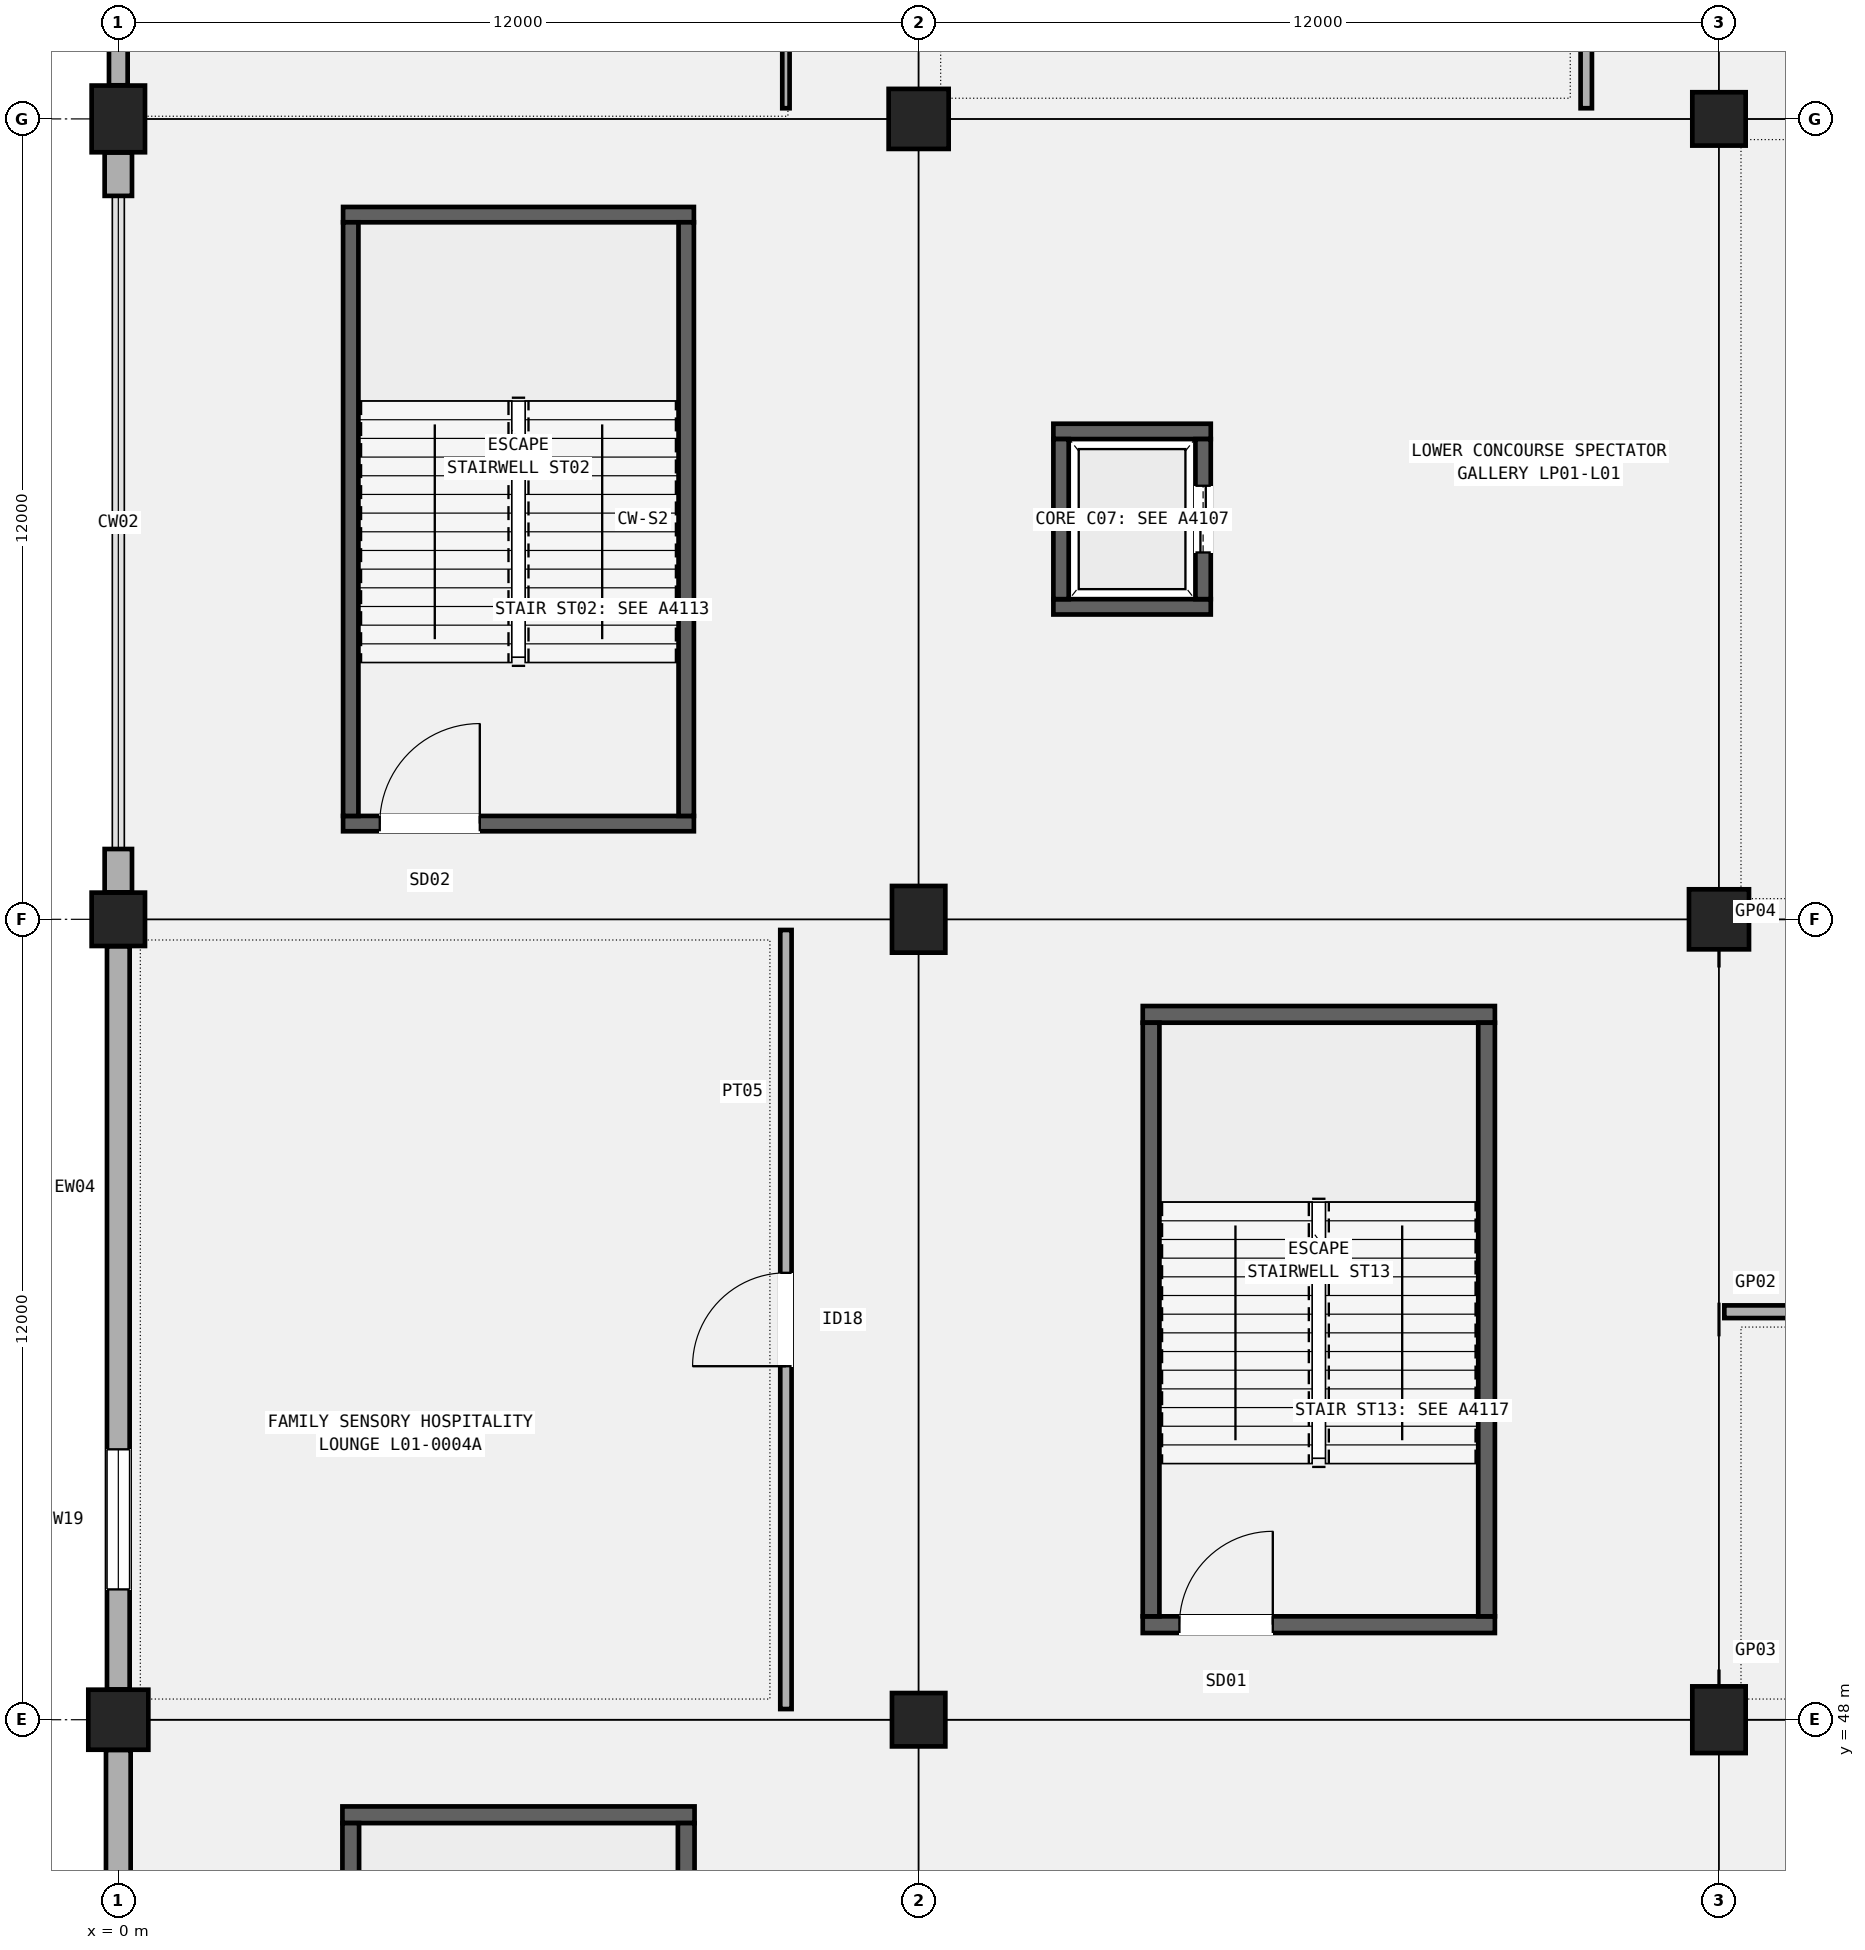
"""IFC4 building model, lengths in metres.
Left out: names, types, materials, properties, quantities, classifications, styles, units other than length and angle.
Written with IfcOpenShell. Run it as: python <this file> out.ifc"""

import sys

from ifc_helpers import new_model, si_unit, direction, frame, frame_2d, origin, origin_2d, place, context, subcontext, project, spatial, rectangle, extrude, element, fill, save


model = new_model("IFC4")
c1 = context("Model", 3, precision=1e-05, world=origin(), true_north=direction((0.0, 1.0)))
c2 = subcontext(c1, "Body", "Model", "MODEL_VIEW")
j1 = project(units=[si_unit("LENGTHUNIT", "METRE"), si_unit("PLANEANGLEUNIT", "RADIAN")], contexts=[c1])
p1 = place(None, origin())
s1 = spatial("IfcSite", under=j1, at=p1, CompositionType="ELEMENT")
p2 = place(p1, origin())
s2 = spatial("IfcBuilding", under=s1, at=p2, CompositionType="ELEMENT")
p3 = place(p2, frame((0.0, 0.0, 5.4)))
s3 = spatial("IfcBuildingStorey", under=s2, at=p3, CompositionType="ELEMENT", Elevation=5.4)
p4 = place(p3, frame((0.0, 48.0, 0.0), z_axis=(0.0, 0.0, 1.0), x_axis=(1.0, 0.0, 0.0)))
e1 = element("IfcColumn", 1, at=p4, inside=s3, PredefinedType="COLUMN", context=c2, shape_type="SweptSolid", body=[
    extrude(rectangle(XDim=0.9, YDim=0.9, at=origin_2d()), origin(), (0.0, 0.0, 1.0), 4.8),
])
p5 = place(p3, frame((0.0, 60.0, 0.0), z_axis=(0.0, 0.0, 1.0), x_axis=(1.0, 0.0, 0.0)))
e2 = element("IfcColumn", 2, at=p5, inside=s3, PredefinedType="COLUMN", context=c2, shape_type="SweptSolid", body=[
    extrude(rectangle(XDim=0.8, YDim=0.8, at=origin_2d()), origin(), (0.0, 0.0, 1.0), 4.8),
])
p6 = place(p3, frame((0.0, 72.0, 0.0), z_axis=(0.0, 0.0, 1.0), x_axis=(1.0, 0.0, 0.0)))
e3 = element("IfcColumn", 3, at=p6, inside=s3, PredefinedType="COLUMN", context=c2, shape_type="SweptSolid", body=[
    extrude(rectangle(XDim=0.8, YDim=1.0, at=origin_2d()), origin(), (0.0, 0.0, 1.0), 4.8),
])
p7 = place(p3, frame((12.0, 48.0, 0.0), z_axis=(0.0, 0.0, 1.0), x_axis=(1.0, 0.0, 0.0)))
e4 = element("IfcColumn", 4, at=p7, inside=s3, PredefinedType="COLUMN", context=c2, shape_type="SweptSolid", body=[
    extrude(rectangle(XDim=0.8, YDim=0.8, at=origin_2d()), origin(), (0.0, 0.0, 1.0), 4.8),
])
p8 = place(p3, frame((12.0, 60.0, 0.0), z_axis=(0.0, 0.0, 1.0), x_axis=(1.0, 0.0, 0.0)))
e5 = element("IfcColumn", 5, at=p8, inside=s3, PredefinedType="COLUMN", context=c2, shape_type="SweptSolid", body=[
    extrude(rectangle(XDim=0.8, YDim=1.0, at=origin_2d()), origin(), (0.0, 0.0, 1.0), 4.8),
])
p9 = place(p3, frame((12.0, 72.0, 0.0), z_axis=(0.0, 0.0, 1.0), x_axis=(1.0, 0.0, 0.0)))
e6 = element("IfcColumn", 6, at=p9, inside=s3, PredefinedType="COLUMN", context=c2, shape_type="SweptSolid", body=[
    extrude(rectangle(XDim=0.9, YDim=0.9, at=origin_2d()), origin(), (0.0, 0.0, 1.0), 4.8),
])
p10 = place(p3, frame((24.0, 48.0, 0.0), z_axis=(0.0, 0.0, 1.0), x_axis=(1.0, 0.0, 0.0)))
e7 = element("IfcColumn", 7, at=p10, inside=s3, PredefinedType="COLUMN", context=c2, shape_type="SweptSolid", body=[
    extrude(rectangle(XDim=0.8, YDim=1.0, at=origin_2d()), origin(), (0.0, 0.0, 1.0), 4.8),
])
p11 = place(p3, frame((24.0, 60.0, 0.0), z_axis=(0.0, 0.0, 1.0), x_axis=(1.0, 0.0, 0.0)))
e8 = element("IfcColumn", 8, at=p11, inside=s3, PredefinedType="COLUMN", context=c2, shape_type="SweptSolid", body=[
    extrude(rectangle(XDim=0.9, YDim=0.9, at=origin_2d()), origin(), (0.0, 0.0, 1.0), 4.8),
])
p12 = place(p3, frame((24.0, 72.0, 0.0), z_axis=(0.0, 0.0, 1.0), x_axis=(1.0, 0.0, 0.0)))
e9 = element("IfcColumn", 9, at=p12, inside=s3, PredefinedType="COLUMN", context=c2, shape_type="SweptSolid", body=[
    extrude(rectangle(XDim=0.8, YDim=0.8, at=origin_2d()), origin(), (0.0, 0.0, 1.0), 4.8),
])
p13 = place(p3, frame((0.0, 36.504, 0.0), z_axis=(0.0, 0.0, 1.0), x_axis=(0.0, 1.0, 0.0)))
e10 = element("IfcWall", 10, at=p13, inside=s3, PredefinedType="SOLIDWALL", context=c2, shape_type="SweptSolid", body=[
    extrude(rectangle(XDim=11.042, YDim=0.37, at=frame_2d((5.521, 0.0))), origin(), (0.0, 0.0, 1.0), 4.2),
])
p14 = place(p13, frame((2.75, 0.0, 0.95)))
e11 = element("IfcOpeningElement", 11, at=p14, cuts=e10, PredefinedType="OPENING", context=c2, shape_type="SweptSolid", body=[
    extrude(rectangle(XDim=2.1, YDim=1.85, at=frame_2d((1.05, 0.925))), frame((0.0, 0.195, 0.0), z_axis=(0.0, -1.0, 0.0), x_axis=(1.0, 0.0, 0.0)), (0.0, 0.0, 1.0), 0.39),
])
p15 = place(p3, frame((0.0, 48.454, 0.0), z_axis=(0.0, 0.0, 1.0), x_axis=(0.0, 1.0, 0.0)))
e12 = element("IfcWall", 12, at=p15, inside=s3, PredefinedType="SOLIDWALL", context=c2, shape_type="SweptSolid", body=[
    extrude(rectangle(XDim=11.142, YDim=0.34, at=frame_2d((5.571, 0.0))), origin(), (0.0, 0.0, 1.0), 4.15),
])
p16 = place(p15, frame((1.5, 0.0, 0.95)))
e13 = element("IfcOpeningElement", 13, at=p16, cuts=e12, PredefinedType="OPENING", context=c2, shape_type="SweptSolid", body=[
    extrude(rectangle(XDim=2.1, YDim=2.25, at=frame_2d((1.05, 1.125))), frame((0.0, 0.18, 0.0), z_axis=(0.0, -1.0, 0.0), x_axis=(1.0, 0.0, 0.0)), (0.0, 0.0, 1.0), 0.36),
])
p17 = place(p3, frame((0.0, 60.404, 0.0), z_axis=(0.0, 0.0, 1.0), x_axis=(0.0, 1.0, 0.0)))
e14 = element("IfcWall", 14, at=p17, inside=s3, PredefinedType="SOLIDWALL", context=c2, shape_type="SweptSolid", body=[
    extrude(rectangle(XDim=0.65, YDim=0.41, at=frame_2d((0.325, 0.0))), origin(), (0.0, 0.0, 1.0), 4.2),
])
p18 = place(p3, frame((0.0, 70.846, 0.0), z_axis=(0.0, 0.0, 1.0), x_axis=(0.0, 1.0, 0.0)))
e15 = element("IfcWall", 15, at=p18, inside=s3, PredefinedType="SOLIDWALL", context=c2, shape_type="SweptSolid", body=[
    extrude(rectangle(XDim=0.65, YDim=0.41, at=frame_2d((0.325, 0.0))), origin(), (0.0, 0.0, 1.0), 4.2),
])
p19 = place(p3, frame((0.0, 72.504, 0.0), z_axis=(0.0, 0.0, 1.0), x_axis=(0.0, 1.0, 0.0)))
e16 = element("IfcWall", 16, at=p19, inside=s3, PredefinedType="SOLIDWALL", context=c2, shape_type="SweptSolid", body=[
    extrude(rectangle(XDim=11.042, YDim=0.28, at=frame_2d((5.521, 0.0))), origin(), (0.0, 0.0, 1.0), 4.15),
])
p20 = place(p19, frame((1.5, 0.0, 0.95)))
e17 = element("IfcOpeningElement", 17, at=p20, cuts=e16, PredefinedType="OPENING", context=c2, shape_type="SweptSolid", body=[
    extrude(rectangle(XDim=2.1, YDim=2.6, at=frame_2d((1.05, 1.3))), frame((0.0, 0.15, 0.0), z_axis=(0.0, -1.0, 0.0), x_axis=(1.0, 0.0, 0.0)), (0.0, 0.0, 1.0), 0.3),
])
p21 = place(p3, frame((3.36, 46.575, 0.0), z_axis=(0.0, 0.0, 1.0), x_axis=(1.0, 0.0, 0.0)))
e18 = element("IfcWall", 18, at=p21, inside=s3, PredefinedType="SHEAR", context=c2, shape_type="SweptSolid", body=[
    extrude(rectangle(XDim=5.28, YDim=0.25, at=frame_2d((2.64, 0.0))), origin(), (0.0, 0.0, 1.0), 4.55),
])
for number, where, z_axis, x_axis in (
    (19, (3.485, 37.55, 0.0), (0.0, 0.0, 1.0), (0.0, 1.0, 0.0)),
    (20, (8.515, 37.55, 0.0), (0.0, 0.0, 1.0), (0.0, 1.0, 0.0)),
):
    element("IfcWall", number, at=place(p3, frame(where, z_axis=z_axis, x_axis=x_axis)), inside=s3, PredefinedType="SHEAR", context=c2, shape_type="SweptSolid", body=[
        extrude(rectangle(XDim=8.9, YDim=0.25, at=frame_2d((4.45, 0.0))), origin(), (0.0, 0.0, 1.0), 4.55),
    ])
p22 = place(p3, frame((3.37, 61.435, 0.0), z_axis=(0.0, 0.0, 1.0), x_axis=(1.0, 0.0, 0.0)))
e21 = element("IfcWall", 21, at=p22, inside=s3, PredefinedType="SHEAR", context=c2, shape_type="SweptSolid", body=[
    extrude(rectangle(XDim=5.26, YDim=0.23, at=frame_2d((2.63, 0.0))), origin(), (0.0, 0.0, 1.0), 4.55),
])
p23 = place(p22, frame((0.55, 0.0, 0.0)))
e22 = element("IfcOpeningElement", 22, at=p23, cuts=e21, PredefinedType="OPENING", context=c2, shape_type="SweptSolid", body=[
    extrude(rectangle(XDim=1.5, YDim=2.2, at=frame_2d((0.75, 1.1))), frame((0.0, 0.125, 0.0), z_axis=(0.0, -1.0, 0.0), x_axis=(1.0, 0.0, 0.0)), (0.0, 0.0, 1.0), 0.25),
])
p24 = place(p3, frame((3.37, 70.565, 0.0), z_axis=(0.0, 0.0, 1.0), x_axis=(1.0, 0.0, 0.0)))
e23 = element("IfcWall", 23, at=p24, inside=s3, PredefinedType="SHEAR", context=c2, shape_type="SweptSolid", body=[
    extrude(rectangle(XDim=5.26, YDim=0.23, at=frame_2d((2.63, 0.0))), origin(), (0.0, 0.0, 1.0), 4.55),
])
for number, where, z_axis, x_axis in (
    (24, (3.485, 61.55, 0.0), (0.0, 0.0, 1.0), (0.0, 1.0, 0.0)),
    (25, (8.515, 61.55, 0.0), (0.0, 0.0, 1.0), (0.0, 1.0, 0.0)),
):
    element("IfcWall", number, at=place(p3, frame(where, z_axis=z_axis, x_axis=x_axis)), inside=s3, PredefinedType="SHEAR", context=c2, shape_type="SweptSolid", body=[
        extrude(rectangle(XDim=8.9, YDim=0.23, at=frame_2d((4.45, 0.0))), origin(), (0.0, 0.0, 1.0), 4.55),
    ])
p25 = place(p3, frame((15.36, 49.425, 0.0), z_axis=(0.0, 0.0, 1.0), x_axis=(1.0, 0.0, 0.0)))
e26 = element("IfcWall", 26, at=p25, inside=s3, PredefinedType="SHEAR", context=c2, shape_type="SweptSolid", body=[
    extrude(rectangle(XDim=5.28, YDim=0.25, at=frame_2d((2.64, 0.0))), origin(), (0.0, 0.0, 1.0), 4.55),
])
p26 = place(p25, frame((0.55, 0.0, 0.0)))
e27 = element("IfcOpeningElement", 27, at=p26, cuts=e26, PredefinedType="OPENING", context=c2, shape_type="SweptSolid", body=[
    extrude(rectangle(XDim=1.4, YDim=2.15, at=frame_2d((0.7, 1.075))), frame((0.0, 0.135, 0.0), z_axis=(0.0, -1.0, 0.0), x_axis=(1.0, 0.0, 0.0)), (0.0, 0.0, 1.0), 0.27),
])
p27 = place(p3, frame((15.36, 58.575, 0.0), z_axis=(0.0, 0.0, 1.0), x_axis=(1.0, 0.0, 0.0)))
e28 = element("IfcWall", 28, at=p27, inside=s3, PredefinedType="SHEAR", context=c2, shape_type="SweptSolid", body=[
    extrude(rectangle(XDim=5.28, YDim=0.25, at=frame_2d((2.64, 0.0))), origin(), (0.0, 0.0, 1.0), 4.55),
])
for number, where, z_axis, x_axis in (
    (29, (15.485, 49.55, 0.0), (0.0, 0.0, 1.0), (0.0, 1.0, 0.0)),
    (30, (20.515, 49.55, 0.0), (0.0, 0.0, 1.0), (0.0, 1.0, 0.0)),
):
    element("IfcWall", number, at=place(p3, frame(where, z_axis=z_axis, x_axis=x_axis)), inside=s3, PredefinedType="SHEAR", context=c2, shape_type="SweptSolid", body=[
        extrude(rectangle(XDim=8.9, YDim=0.25, at=frame_2d((4.45, 0.0))), origin(), (0.0, 0.0, 1.0), 4.55),
    ])
for number, where, z_axis, x_axis in (
    (31, (14.02, 64.685, 0.0), (0.0, 0.0, 1.0), (1.0, 0.0, 0.0)),
    (32, (14.02, 67.315, 0.0), (0.0, 0.0, 1.0), (1.0, 0.0, 0.0)),
):
    element("IfcWall", number, at=place(p3, frame(where, z_axis=z_axis, x_axis=x_axis)), inside=s3, PredefinedType="SHEAR", context=c2, shape_type="SweptSolid", body=[
        extrude(rectangle(XDim=2.36, YDim=0.23, at=frame_2d((1.18, 0.0))), origin(), (0.0, 0.0, 1.0), 4.55),
    ])
p28 = place(p3, frame((14.135, 64.8, 0.0), z_axis=(0.0, 0.0, 1.0), x_axis=(0.0, 1.0, 0.0)))
e33 = element("IfcWall", 33, at=p28, inside=s3, PredefinedType="SHEAR", context=c2, shape_type="SweptSolid", body=[
    extrude(rectangle(XDim=2.4, YDim=0.23, at=frame_2d((1.2, 0.0))), origin(), (0.0, 0.0, 1.0), 4.55),
])
p29 = place(p3, frame((16.265, 64.8, 0.0), z_axis=(0.0, 0.0, 1.0), x_axis=(0.0, 1.0, 0.0)))
e34 = element("IfcWall", 34, at=p29, inside=s3, PredefinedType="SHEAR", context=c2, shape_type="SweptSolid", body=[
    extrude(rectangle(XDim=2.4, YDim=0.23, at=frame_2d((1.2, 0.0))), origin(), (0.0, 0.0, 1.0), 4.55),
])
p30 = place(p29, frame((0.7, 0.0, 0.0)))
e35 = element("IfcOpeningElement", 35, at=p30, cuts=e34, PredefinedType="OPENING", context=c2, shape_type="SweptSolid", body=[
    extrude(rectangle(XDim=1.0, YDim=2.15, at=frame_2d((0.5, 1.075))), frame((0.0, 0.125, 0.0), z_axis=(0.0, -1.0, 0.0), x_axis=(1.0, 0.0, 0.0)), (0.0, 0.0, 1.0), 0.25),
])
p31 = place(p3, frame((10.01, 48.16, 0.0), z_axis=(0.0, 0.0, 1.0), x_axis=(0.0, 1.0, 0.0)))
e36 = element("IfcWall", 36, at=p31, inside=s3, PredefinedType="PARTITIONING", context=c2, shape_type="SweptSolid", body=[
    extrude(rectangle(XDim=11.68, YDim=0.17, at=frame_2d((5.84, 0.0))), origin(), (0.0, 0.0, 1.0), 3.92),
])
p32 = place(p31, frame((5.14, 0.0, 0.0)))
e37 = element("IfcOpeningElement", 37, at=p32, cuts=e36, PredefinedType="OPENING", context=c2, shape_type="SweptSolid", body=[
    extrude(rectangle(XDim=1.4, YDim=2.24, at=frame_2d((0.7, 1.12))), frame((0.0, 0.095, 0.0), z_axis=(0.0, -1.0, 0.0), x_axis=(1.0, 0.0, 0.0)), (0.0, 0.0, 1.0), 0.19),
])
p33 = place(p3, frame((10.01, 72.16, 0.0), z_axis=(0.0, 0.0, 1.0), x_axis=(0.0, 1.0, 0.0)))
e38 = element("IfcWall", 38, at=p33, inside=s3, PredefinedType="PARTITIONING", context=c2, shape_type="SweptSolid", body=[
    extrude(rectangle(XDim=11.68, YDim=0.11, at=frame_2d((5.84, 0.0))), origin(), (0.0, 0.0, 1.0), 3.92),
])
p34 = place(p33, frame((5.12, 0.0, 0.0)))
e39 = element("IfcOpeningElement", 39, at=p34, cuts=e38, PredefinedType="OPENING", context=c2, shape_type="SweptSolid", body=[
    extrude(rectangle(XDim=1.44, YDim=2.26, at=frame_2d((0.72, 1.13))), frame((0.0, 0.065, 0.0), z_axis=(0.0, -1.0, 0.0), x_axis=(1.0, 0.0, 0.0)), (0.0, 0.0, 1.0), 0.13),
])
p35 = place(p3, frame((22.01, 72.16, 0.0), z_axis=(0.0, 0.0, 1.0), x_axis=(0.0, 1.0, 0.0)))
e40 = element("IfcWall", 40, at=p35, inside=s3, PredefinedType="PARTITIONING", context=c2, shape_type="SweptSolid", body=[
    extrude(rectangle(XDim=11.68, YDim=0.17, at=frame_2d((5.84, 0.0))), origin(), (0.0, 0.0, 1.0), 3.92),
])
p36 = place(p35, frame((5.015, 0.0, 0.0)))
e41 = element("IfcOpeningElement", 41, at=p36, cuts=e40, PredefinedType="OPENING", context=c2, shape_type="SweptSolid", body=[
    extrude(rectangle(XDim=1.65, YDim=2.28, at=frame_2d((0.825, 1.14))), frame((0.0, 0.095, 0.0), z_axis=(0.0, -1.0, 0.0), x_axis=(1.0, 0.0, 0.0)), (0.0, 0.0, 1.0), 0.19),
])
p37 = place(p3, frame((24.08, 54.117, 0.0), z_axis=(0.0, 0.0, 1.0), x_axis=(1.0, 0.0, 0.0)))
e42 = element("IfcWall", 42, at=p37, inside=s3, PredefinedType="PARTITIONING", context=c2, shape_type="SweptSolid", body=[
    extrude(rectangle(XDim=10.34, YDim=0.19, at=frame_2d((5.17, 0.0))), origin(), (0.0, 0.0, 1.0), 3.92),
])
p38 = place(p16, origin())
e43 = element("IfcWindow", 43, at=p38, inside=s3, PartitioningType="SINGLE_PANEL", PredefinedType="WINDOW", context=c2, shape_type="SweptSolid", body=[
    extrude(rectangle(XDim=2.1, YDim=2.25, at=frame_2d((1.05, 1.125))), frame((0.0, 0.03, 0.0), z_axis=(0.0, -1.0, 0.0), x_axis=(1.0, 0.0, 0.0)), (0.0, 0.0, 1.0), 0.06),
])
fill(e13, e43)
p39 = place(p23, origin())
e44 = element("IfcDoor", 44, at=p39, inside=s3, OperationType="SINGLE_SWING_RIGHT", PredefinedType="DOOR", context=c2, shape_type="SweptSolid", body=[
    extrude(rectangle(XDim=1.5, YDim=2.2, at=frame_2d((0.75, 1.1))), frame((0.0, 0.025, 0.0), z_axis=(0.0, -1.0, 0.0), x_axis=(1.0, 0.0, 0.0)), (0.0, 0.0, 1.0), 0.05),
])
fill(e22, e44)
p40 = place(p26, origin())
e45 = element("IfcDoor", 45, at=p40, inside=s3, OperationType="SINGLE_SWING_RIGHT", PredefinedType="DOOR", context=c2, shape_type="SweptSolid", body=[
    extrude(rectangle(XDim=1.4, YDim=2.15, at=frame_2d((0.7, 1.075))), frame((0.0, 0.025, 0.0), z_axis=(0.0, -1.0, 0.0), x_axis=(1.0, 0.0, 0.0)), (0.0, 0.0, 1.0), 0.05),
])
fill(e27, e45)
p41 = place(p30, origin())
e46 = element("IfcDoor", 46, at=p41, inside=s3, OperationType="DOUBLE_DOOR_SLIDING", PredefinedType="DOOR", context=c2, shape_type="SweptSolid", body=[
    extrude(rectangle(XDim=1.0, YDim=2.15, at=frame_2d((0.5, 1.075))), frame((0.0, 0.025, 0.0), z_axis=(0.0, -1.0, 0.0), x_axis=(1.0, 0.0, 0.0)), (0.0, 0.0, 1.0), 0.05),
])
fill(e35, e46)
p42 = place(p32, origin())
e47 = element("IfcDoor", 47, at=p42, inside=s3, OperationType="SINGLE_SWING_LEFT", PredefinedType="DOOR", context=c2, shape_type="SweptSolid", body=[
    extrude(rectangle(XDim=1.4, YDim=2.24, at=frame_2d((0.7, 1.12))), frame((0.0, 0.025, 0.0), z_axis=(0.0, -1.0, 0.0), x_axis=(1.0, 0.0, 0.0)), (0.0, 0.0, 1.0), 0.05),
])
fill(e37, e47)
save(model, sys.argv[1])
